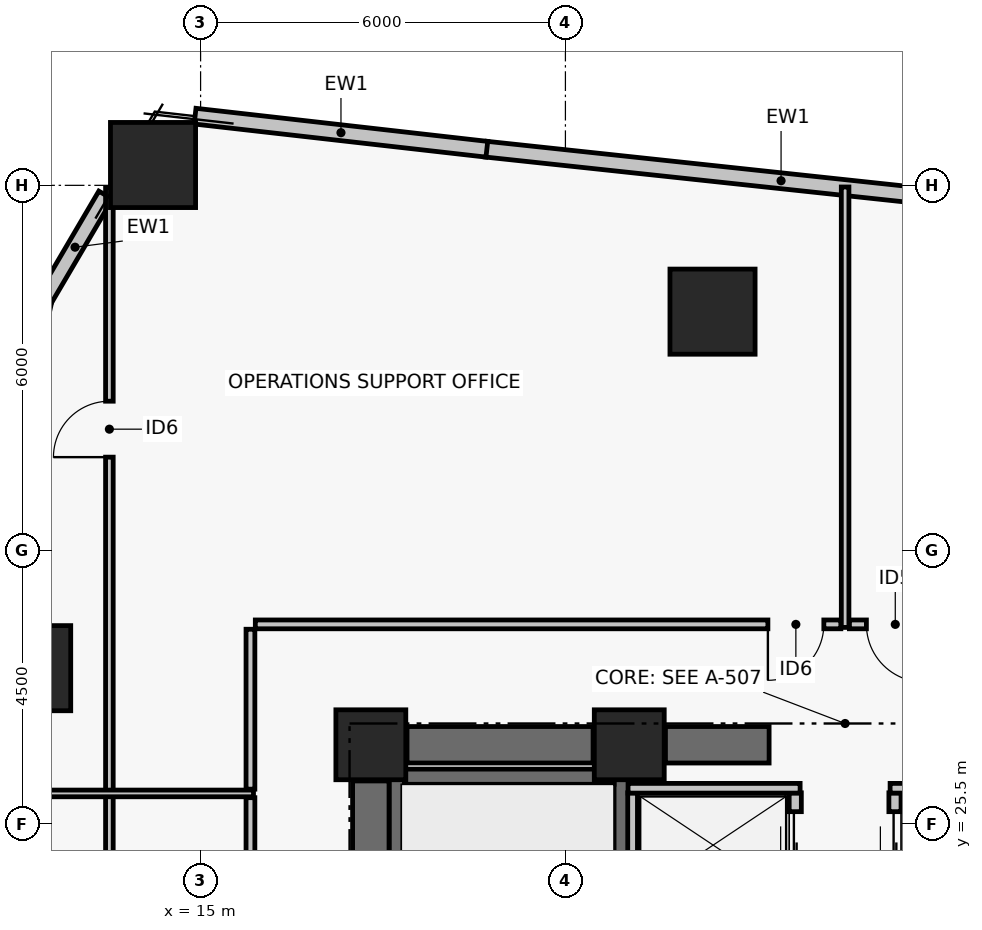
"""IFC4 building model, lengths in metres.
Left out: names, types, materials, properties, quantities, classifications, styles, units other than length and angle.
Written with IfcOpenShell. Run it as: python <this file> out.ifc"""

import sys

from ifc_helpers import new_model, si_unit, direction, frame, frame_2d, origin, origin_2d, place, context, subcontext, project, spatial, rectangle, hollow_rectangle, extrude, element, fill, save


model = new_model("IFC4")
c1 = context("Model", 3, precision=1e-05, world=origin(), true_north=direction((0.0, 1.0)))
c2 = subcontext(c1, "Body", "Model", "MODEL_VIEW")
j1 = project(units=[si_unit("LENGTHUNIT", "METRE"), si_unit("PLANEANGLEUNIT", "RADIAN")], contexts=[c1])
p1 = place(None, origin())
s1 = spatial("IfcSite", under=j1, at=p1, CompositionType="ELEMENT")
p2 = place(p1, origin())
s2 = spatial("IfcBuilding", under=s1, at=p2, CompositionType="ELEMENT")
p3 = place(p2, frame((0.0, 0.0, 64.8)))
s3 = spatial("IfcBuildingStorey", under=s2, at=p3, CompositionType="ELEMENT", Elevation=64.8)
for number, where, z_axis, x_axis in (
    (1, (17.8, 26.8, 0.0), (0.0, 0.0, 1.0), (1.0, 0.0, 0.0)),
    (2, (22.05, 26.8, 0.0), (0.0, 0.0, 1.0), (1.0, 0.0, 0.0)),
):
    element("IfcColumn", number, at=place(p3, frame(where, z_axis=z_axis, x_axis=x_axis)), inside=s3, PredefinedType="COLUMN", context=c2, shape_type="SweptSolid", body=[
        extrude(rectangle(XDim=1.15, YDim=1.15, at=origin_2d()), origin(), (0.0, 0.0, 1.0), 3.72),
    ])
p4 = place(p3, frame((18.395, 26.8, 0.0), z_axis=(0.0, 0.0, 1.0), x_axis=(1.0, 0.0, 0.0)))
e3 = element("IfcWall", 3, at=p4, inside=s3, PredefinedType="SHEAR", context=c2, shape_type="SweptSolid", body=[
    extrude(rectangle(XDim=3.06, YDim=0.6, at=frame_2d((1.53, 0.0))), origin(), (0.0, 0.0, 1.0), 3.44),
])
p5 = place(p3, frame((22.645, 26.8, 0.0), z_axis=(0.0, 0.0, 1.0), x_axis=(1.0, 0.0, 0.0)))
e4 = element("IfcWall", 4, at=p5, inside=s3, PredefinedType="SHEAR", context=c2, shape_type="SweptSolid", body=[
    extrude(rectangle(XDim=1.705, YDim=0.6, at=frame_2d((0.853, 0.0))), origin(), (0.0, 0.0, 1.0), 3.44),
])
p6 = place(p3, frame((17.8, 17.795, 0.0), z_axis=(0.0, 0.0, 1.0), x_axis=(0.0, 1.0, 0.0)))
e5 = element("IfcWall", 5, at=p6, inside=s3, PredefinedType="SHEAR", context=c2, shape_type="SweptSolid", body=[
    extrude(rectangle(XDim=8.41, YDim=0.6, at=frame_2d((4.205, 0.0))), origin(), (0.0, 0.0, 1.0), 3.44),
])
p7 = place(p3, frame((18.229, 17.6, 0.0), z_axis=(0.0, 0.0, 1.0), x_axis=(0.0, 1.0, 0.0)))
e6 = element("IfcWall", 6, at=p7, inside=s3, PredefinedType="SHEAR", context=c2, shape_type="SweptSolid", body=[
    extrude(rectangle(XDim=8.8, YDim=0.25, at=frame_2d((4.4, 0.0))), origin(), (0.0, 0.0, 1.0), 3.44),
])
p8 = place(p3, frame((21.925, 17.6, 0.0), z_axis=(0.0, 0.0, 1.0), x_axis=(0.0, 1.0, 0.0)))
e7 = element("IfcWall", 7, at=p8, inside=s3, PredefinedType="SHEAR", context=c2, shape_type="SweptSolid", body=[
    extrude(rectangle(XDim=8.8, YDim=0.25, at=frame_2d((4.4, 0.0))), origin(), (0.0, 0.0, 1.0), 3.44),
])
p9 = place(p8, frame((0.35, 0.0, 0.0)))
e8 = element("IfcOpeningElement", 8, at=p9, cuts=e7, PredefinedType="OPENING", context=c2, shape_type="SweptSolid", body=[
    extrude(rectangle(XDim=1.05, YDim=2.08, at=frame_2d((0.525, 1.04))), frame((0.0, 0.135, 0.0), z_axis=(0.0, -1.0, 0.0), x_axis=(1.0, 0.0, 0.0)), (0.0, 0.0, 1.0), 0.27),
])
p10 = place(p3, frame((18.354, 26.275, 0.0), z_axis=(0.0, 0.0, 1.0), x_axis=(1.0, 0.0, 0.0)))
e9 = element("IfcWall", 9, at=p10, inside=s3, PredefinedType="SHEAR", context=c2, shape_type="SweptSolid", body=[
    extrude(rectangle(XDim=3.446, YDim=0.25, at=frame_2d((1.723, 0.0))), origin(), (0.0, 0.0, 1.0), 3.44),
])
for number, where, z_axis, x_axis in (
    (10, (23.419, 33.923, 0.0), (0.0, 0.0, 1.0), (1.0, 0.0, 0.0)),
    (11, (14.218, 36.334, 0.0), (0.0, 0.0, 1.0), (1.0, 0.0, 0.0)),
    (12, (12.164, 28.06, 0.0), (0.0, 0.0, 1.0), (1.0, 0.0, 0.0)),
):
    element("IfcColumn", number, at=place(p3, frame(where, z_axis=z_axis, x_axis=x_axis)), inside=s3, PredefinedType="COLUMN", context=c2, shape_type="SweptSolid", body=[
        extrude(hollow_rectangle(XDim=1.4, YDim=1.4, WallThickness=0.055, at=origin_2d()), origin(), (0.0, 0.0, 1.0), 3.72),
    ])
p11 = place(p3, frame((19.696, 36.595, 0.0), z_axis=(0.0, 0.0, 1.0), x_axis=(0.994319088673, -0.106440358419, 0.0)))
e13 = element("IfcWall", 13, at=p11, inside=s3, PredefinedType="PARTITIONING", context=c2, shape_type="SweptSolid", body=[
    extrude(rectangle(XDim=9.757, YDim=0.26, at=frame_2d((4.879, 0.0))), origin(), (0.0, 0.0, 1.0), 3.44),
])
p12 = place(p3, frame((14.909, 37.138, 0.0), z_axis=(0.0, 0.0, 1.0), x_axis=(0.993630237788, -0.112689620435, 0.0)))
e14 = element("IfcWall", 14, at=p12, inside=s3, PredefinedType="PARTITIONING", context=c2, shape_type="SweptSolid", body=[
    extrude(rectangle(XDim=4.829, YDim=0.26, at=frame_2d((2.415, 0.0))), origin(), (0.0, 0.0, 1.0), 3.44),
])
p13 = place(p3, frame((12.432, 34.127, 0.0), z_axis=(0.0, 0.0, 1.0), x_axis=(0.506772954594, 0.862079562739, 0.0)))
e15 = element("IfcWall", 15, at=p13, inside=s3, PredefinedType="PARTITIONING", context=c2, shape_type="SweptSolid", body=[
    extrude(rectangle(XDim=1.986, YDim=0.26, at=frame_2d((0.993, 0.0))), origin(), (0.0, 0.0, 1.0), 3.44),
])
p14 = place(p3, frame((24.78, 24.29, 0.0), z_axis=(0.0, 0.0, 1.0), x_axis=(0.0, 1.0, 0.0)))
e16 = element("IfcWall", 16, at=p14, inside=s3, PredefinedType="PARTITIONING", context=c2, shape_type="SweptSolid", body=[
    extrude(rectangle(XDim=1.72, YDim=0.2, at=frame_2d((0.86, 0.0))), origin(), (0.0, 0.0, 1.0), 3.44),
])
p15 = place(p14, frame((0.31, 0.0, 0.0)))
e17 = element("IfcOpeningElement", 17, at=p15, cuts=e16, PredefinedType="OPENING", context=c2, shape_type="SweptSolid", body=[
    extrude(rectangle(XDim=1.1, YDim=2.08, at=frame_2d((0.55, 1.04))), frame((0.0, 0.11, 0.0), z_axis=(0.0, -1.0, 0.0), x_axis=(1.0, 0.0, 0.0)), (0.0, 0.0, 1.0), 0.22),
])
p16 = place(p3, frame((26.42, 24.29, 0.0), z_axis=(0.0, 0.0, 1.0), x_axis=(0.0, 1.0, 0.0)))
e18 = element("IfcWall", 18, at=p16, inside=s3, PredefinedType="PARTITIONING", context=c2, shape_type="SweptSolid", body=[
    extrude(rectangle(XDim=1.72, YDim=0.2, at=frame_2d((0.86, 0.0))), origin(), (0.0, 0.0, 1.0), 3.44),
])
p17 = place(p16, frame((0.31, 0.0, 0.0)))
e19 = element("IfcOpeningElement", 19, at=p17, cuts=e18, PredefinedType="OPENING", context=c2, shape_type="SweptSolid", body=[
    extrude(rectangle(XDim=1.1, YDim=2.08, at=frame_2d((0.55, 1.04))), frame((0.0, 0.11, 0.0), z_axis=(0.0, -1.0, 0.0), x_axis=(1.0, 0.0, 0.0)), (0.0, 0.0, 1.0), 0.22),
])
p18 = place(p3, frame((22.105, 20.56, 0.0), z_axis=(0.0, 0.0, 1.0), x_axis=(0.0, 1.0, 0.0)))
e20 = element("IfcWall", 20, at=p18, inside=s3, PredefinedType="PARTITIONING", context=c2, shape_type="SweptSolid", body=[
    extrude(rectangle(XDim=5.45, YDim=0.16, at=frame_2d((2.725, 0.0))), origin(), (0.0, 0.0, 1.0), 3.44),
])
p19 = place(p3, frame((22.03, 26.085, 0.0), z_axis=(0.0, 0.0, 1.0), x_axis=(1.0, 0.0, 0.0)))
e21 = element("IfcWall", 21, at=p19, inside=s3, PredefinedType="PARTITIONING", context=c2, shape_type="SweptSolid", body=[
    extrude(rectangle(XDim=2.83, YDim=0.16, at=frame_2d((1.415, 0.0))), origin(), (0.0, 0.0, 1.0), 3.44),
])
p20 = place(p3, frame((26.34, 26.085, 0.0), z_axis=(0.0, 0.0, 1.0), x_axis=(1.0, 0.0, 0.0)))
e22 = element("IfcWall", 22, at=p20, inside=s3, PredefinedType="PARTITIONING", context=c2, shape_type="SweptSolid", body=[
    extrude(rectangle(XDim=2.83, YDim=0.16, at=frame_2d((1.415, 0.0))), origin(), (0.0, 0.0, 1.0), 3.44),
])
p21 = place(p3, frame((32.8, 28.78, 0.0), z_axis=(0.0, 0.0, 1.0), x_axis=(-1.0, 0.0, 0.0)))
e23 = element("IfcWall", 23, at=p21, inside=s3, PredefinedType="PARTITIONING", context=c2, shape_type="SweptSolid", body=[
    extrude(rectangle(XDim=7.13, YDim=0.145, at=frame_2d((3.565, 0.0))), origin(), (0.0, 0.0, 1.0), 2.97),
])
p22 = place(p21, frame((5.9, 0.0, 0.0)))
e24 = element("IfcOpeningElement", 24, at=p22, cuts=e23, PredefinedType="OPENING", context=c2, shape_type="SweptSolid", body=[
    extrude(rectangle(XDim=0.95, YDim=2.06, at=frame_2d((0.475, 1.03))), frame((0.0, 0.083, 0.0), z_axis=(0.0, -1.0, 0.0), x_axis=(1.0, 0.0, 0.0)), (0.0, 0.0, 1.0), 0.165),
])
p23 = place(p3, frame((25.53, 28.78, 0.0), z_axis=(0.0, 0.0, 1.0), x_axis=(-1.0, 0.0, 0.0)))
e25 = element("IfcWall", 25, at=p23, inside=s3, PredefinedType="PARTITIONING", context=c2, shape_type="SweptSolid", body=[
    extrude(rectangle(XDim=9.63, YDim=0.145, at=frame_2d((4.815, 0.0))), origin(), (0.0, 0.0, 1.0), 2.57),
])
p24 = place(p23, frame((0.28, 0.0, 0.0)))
e26 = element("IfcOpeningElement", 26, at=p24, cuts=e25, PredefinedType="OPENING", context=c2, shape_type="SweptSolid", body=[
    extrude(rectangle(XDim=0.92, YDim=2.05, at=frame_2d((0.46, 1.025))), frame((0.0, 0.083, 0.0), z_axis=(0.0, -1.0, 0.0), x_axis=(1.0, 0.0, 0.0)), (0.0, 0.0, 1.0), 0.165),
])
p25 = place(p3, frame((15.82, 28.7, 0.0), z_axis=(0.0, 0.0, 1.0), x_axis=(0.0, -1.0, 0.0)))
e27 = element("IfcWall", 27, at=p25, inside=s3, PredefinedType="PARTITIONING", context=c2, shape_type="SweptSolid", body=[
    extrude(rectangle(XDim=2.63, YDim=0.145, at=frame_2d((1.315, 0.0))), origin(), (0.0, 0.0, 1.0), 2.57),
])
p26 = place(p3, frame((15.82, 25.93, 0.0), z_axis=(0.0, 0.0, 1.0), x_axis=(0.0, -1.0, 0.0)))
e28 = element("IfcWall", 28, at=p26, inside=s3, PredefinedType="PARTITIONING", context=c2, shape_type="SweptSolid", body=[
    extrude(rectangle(XDim=7.86, YDim=0.145, at=frame_2d((3.93, 0.0))), origin(), (0.0, 0.0, 1.0), 2.97),
])
p27 = place(p26, frame((3.455, 0.0, 0.0)))
e29 = element("IfcOpeningElement", 29, at=p27, cuts=e28, PredefinedType="OPENING", context=c2, shape_type="SweptSolid", body=[
    extrude(rectangle(XDim=0.95, YDim=2.06, at=frame_2d((0.475, 1.03))), frame((0.0, 0.083, 0.0), z_axis=(0.0, -1.0, 0.0), x_axis=(1.0, 0.0, 0.0)), (0.0, 0.0, 1.0), 0.165),
])
p28 = place(p3, frame((13.5, 8.037, 0.0), z_axis=(0.0, 0.0, 1.0), x_axis=(0.0, 1.0, 0.0)))
e30 = element("IfcWall", 30, at=p28, inside=s3, PredefinedType="PARTITIONING", context=c2, shape_type="SweptSolid", body=[
    extrude(rectangle(XDim=27.926, YDim=0.125, at=frame_2d((13.963, 0.0))), origin(), (0.0, 0.0, 1.0), 2.57),
])
p29 = place(p28, frame((3.513, 0.0, 0.0)))
e31 = element("IfcOpeningElement", 31, at=p29, cuts=e30, PredefinedType="OPENING", context=c2, shape_type="SweptSolid", body=[
    extrude(rectangle(XDim=0.92, YDim=2.05, at=frame_2d((0.46, 1.025))), frame((0.0, 0.073, 0.0), z_axis=(0.0, -1.0, 0.0), x_axis=(1.0, 0.0, 0.0)), (0.0, 0.0, 1.0), 0.145),
])
p30 = place(p28, frame((23.493, 0.0, 0.0)))
e32 = element("IfcOpeningElement", 32, at=p30, cuts=e30, PredefinedType="OPENING", context=c2, shape_type="SweptSolid", body=[
    extrude(rectangle(XDim=0.92, YDim=2.05, at=frame_2d((0.46, 1.025))), frame((0.0, 0.073, 0.0), z_axis=(0.0, -1.0, 0.0), x_axis=(1.0, 0.0, 0.0)), (0.0, 0.0, 1.0), 0.145),
])
p31 = place(p28, frame((13.503, 0.0, 0.0)))
e33 = element("IfcOpeningElement", 33, at=p31, cuts=e30, PredefinedType="OPENING", context=c2, shape_type="SweptSolid", body=[
    extrude(rectangle(XDim=0.92, YDim=2.05, at=frame_2d((0.46, 1.025))), frame((0.0, 0.073, 0.0), z_axis=(0.0, -1.0, 0.0), x_axis=(1.0, 0.0, 0.0)), (0.0, 0.0, 1.0), 0.145),
])
p32 = place(p3, frame((25.6, 28.73, 0.0), z_axis=(0.0, 0.0, 1.0), x_axis=(0.0, 1.0, 0.0)))
e34 = element("IfcWall", 34, at=p32, inside=s3, PredefinedType="PARTITIONING", context=c2, shape_type="SweptSolid", body=[
    extrude(rectangle(XDim=7.243, YDim=0.125, at=frame_2d((3.622, 0.0))), origin(), (0.0, 0.0, 1.0), 2.82),
])
p33 = place(p3, frame((10.9, 26.0, 0.0), z_axis=(0.0, 0.0, 1.0), x_axis=(1.0, 0.0, 0.0)))
e35 = element("IfcWall", 35, at=p33, inside=s3, PredefinedType="PARTITIONING", context=c2, shape_type="SweptSolid", body=[
    extrude(rectangle(XDim=4.97, YDim=0.11, at=frame_2d((2.485, 0.0))), origin(), (0.0, 0.0, 1.0), 2.82),
])
p34 = place(p15, origin())
e36 = element("IfcDoor", 36, at=p34, inside=s3, OperationType="DOUBLE_DOOR_SLIDING", PredefinedType="DOOR", context=c2, shape_type="SweptSolid", body=[
    extrude(rectangle(XDim=1.1, YDim=2.08, at=frame_2d((0.55, 1.04))), frame((0.0, 0.025, 0.0), z_axis=(0.0, -1.0, 0.0), x_axis=(1.0, 0.0, 0.0)), (0.0, 0.0, 1.0), 0.05),
])
fill(e17, e36)
p35 = place(p17, origin())
e37 = element("IfcDoor", 37, at=p35, inside=s3, OperationType="DOUBLE_DOOR_SLIDING", PredefinedType="DOOR", context=c2, shape_type="SweptSolid", body=[
    extrude(rectangle(XDim=1.1, YDim=2.08, at=frame_2d((0.55, 1.04))), frame((0.0, 0.025, 0.0), z_axis=(0.0, -1.0, 0.0), x_axis=(1.0, 0.0, 0.0)), (0.0, 0.0, 1.0), 0.05),
])
fill(e19, e37)
p36 = place(p22, origin())
e38 = element("IfcDoor", 38, at=p36, inside=s3, OperationType="SINGLE_SWING_LEFT", PredefinedType="DOOR", context=c2, shape_type="SweptSolid", body=[
    extrude(rectangle(XDim=0.95, YDim=2.06, at=frame_2d((0.475, 1.03))), frame((0.0, 0.025, 0.0), z_axis=(0.0, -1.0, 0.0), x_axis=(1.0, 0.0, 0.0)), (0.0, 0.0, 1.0), 0.05),
])
fill(e24, e38)
p37 = place(p24, origin())
e39 = element("IfcDoor", 39, at=p37, inside=s3, OperationType="SINGLE_SWING_RIGHT", PredefinedType="DOOR", context=c2, shape_type="SweptSolid", body=[
    extrude(rectangle(XDim=0.92, YDim=2.05, at=frame_2d((0.46, 1.025))), frame((0.0, 0.025, 0.0), z_axis=(0.0, -1.0, 0.0), x_axis=(1.0, 0.0, 0.0)), (0.0, 0.0, 1.0), 0.05),
])
fill(e26, e39)
p38 = place(p30, origin())
e40 = element("IfcDoor", 40, at=p38, inside=s3, OperationType="SINGLE_SWING_LEFT", PredefinedType="DOOR", context=c2, shape_type="SweptSolid", body=[
    extrude(rectangle(XDim=0.92, YDim=2.05, at=frame_2d((0.46, 1.025))), frame((0.0, 0.025, 0.0), z_axis=(0.0, -1.0, 0.0), x_axis=(1.0, 0.0, 0.0)), (0.0, 0.0, 1.0), 0.05),
])
fill(e32, e40)
save(model, sys.argv[1])
